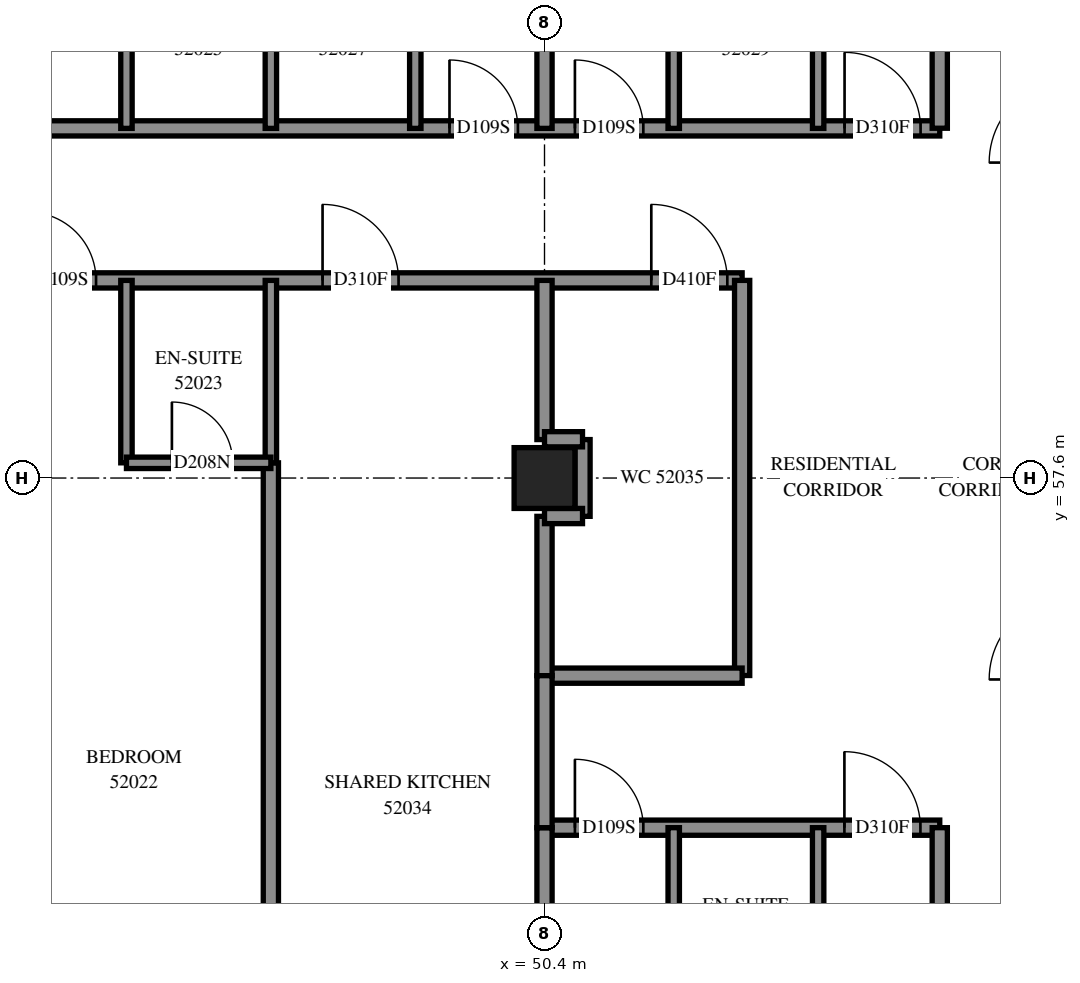
"""IFC4 building model, lengths in metres.
Left out: names, types, materials, properties, quantities, classifications, styles, units other than length and angle.
Written with IfcOpenShell. Run it as: python <this file> out.ifc"""

import sys

from ifc_helpers import new_model, si_unit, direction, frame, frame_2d, origin, origin_2d, place, context, subcontext, project, spatial, rectangle, extrude, element, fill, save


model = new_model("IFC4")
c1 = context("Model", 3, precision=1e-05, world=origin(), true_north=direction((0.0, 1.0)))
c2 = subcontext(c1, "Body", "Model", "MODEL_VIEW")
j1 = project(units=[si_unit("LENGTHUNIT", "METRE"), si_unit("PLANEANGLEUNIT", "RADIAN")], contexts=[c1])
p1 = place(None, origin())
s1 = spatial("IfcSite", under=j1, at=p1, CompositionType="ELEMENT")
p2 = place(p1, origin())
s2 = spatial("IfcBuilding", under=s1, at=p2, CompositionType="ELEMENT")
p3 = place(p2, frame((0.0, 0.0, 193.0)))
s3 = spatial("IfcBuildingStorey", under=s2, at=p3, CompositionType="ELEMENT", Elevation=193.0)
p4 = place(p3, frame((50.4, 57.6, 0.0), z_axis=(0.0, 0.0, 1.0), x_axis=(1.0, 0.0, 0.0)))
e1 = element("IfcColumn", 1, at=p4, inside=s3, PredefinedType="COLUMN", context=c2, shape_type="SweptSolid", body=[
    extrude(rectangle(XDim=0.8, YDim=0.8, at=origin_2d()), origin(), (0.0, 0.0, 1.0), 3.1),
])
p5 = place(p3, frame((36.0, 60.2, 0.0), z_axis=(0.0, 0.0, 1.0), x_axis=(1.0, 0.0, 0.0)))
e2 = element("IfcWall", 2, at=p5, inside=s3, PredefinedType="PARTITIONING", context=c2, shape_type="SweptSolid", body=[
    extrude(rectangle(XDim=17.0, YDim=0.2, at=frame_2d((8.5, 0.0))), origin(), (0.0, 0.0, 1.0), 3.1),
])
p6 = place(p5, frame((4.125, 0.0, 0.0)))
e3 = element("IfcOpeningElement", 3, at=p6, cuts=e2, PredefinedType="OPENING", context=c2, shape_type="SweptSolid", body=[
    extrude(rectangle(XDim=1.0, YDim=2.1, at=frame_2d((0.5, 1.05))), frame((0.0, 0.11, 0.0), z_axis=(0.0, -1.0, 0.0), x_axis=(1.0, 0.0, 0.0)), (0.0, 0.0, 1.0), 0.22),
])
p7 = place(p5, frame((7.6, 0.0, 0.0)))
e4 = element("IfcOpeningElement", 4, at=p7, cuts=e2, PredefinedType="OPENING", context=c2, shape_type="SweptSolid", body=[
    extrude(rectangle(XDim=0.9, YDim=2.1, at=frame_2d((0.45, 1.05))), frame((0.0, 0.11, 0.0), z_axis=(0.0, -1.0, 0.0), x_axis=(1.0, 0.0, 0.0)), (0.0, 0.0, 1.0), 0.22),
])
p8 = place(p5, frame((11.48, 0.0, 0.0)))
e5 = element("IfcOpeningElement", 5, at=p8, cuts=e2, PredefinedType="OPENING", context=c2, shape_type="SweptSolid", body=[
    extrude(rectangle(XDim=1.0, YDim=2.1, at=frame_2d((0.5, 1.05))), frame((0.0, 0.11, 0.0), z_axis=(0.0, -1.0, 0.0), x_axis=(1.0, 0.0, 0.0)), (0.0, 0.0, 1.0), 0.22),
])
p9 = place(p5, frame((15.805, 0.0, 0.0)))
e6 = element("IfcOpeningElement", 6, at=p9, cuts=e2, PredefinedType="OPENING", context=c2, shape_type="SweptSolid", body=[
    extrude(rectangle(XDim=1.0, YDim=2.1, at=frame_2d((0.5, 1.05))), frame((0.0, 0.11, 0.0), z_axis=(0.0, -1.0, 0.0), x_axis=(1.0, 0.0, 0.0)), (0.0, 0.0, 1.0), 0.22),
])
p10 = place(p3, frame((40.602, 62.2, 0.0), z_axis=(0.0, 0.0, 1.0), x_axis=(1.0, 0.0, 0.0)))
e7 = element("IfcWall", 7, at=p10, inside=s3, PredefinedType="PARTITIONING", context=c2, shape_type="SweptSolid", body=[
    extrude(rectangle(XDim=14.998, YDim=0.2, at=frame_2d((7.499, 0.0))), origin(), (0.0, 0.0, 1.0), 3.1),
])
p11 = place(p10, frame((1.306, 0.0, 0.0)))
e8 = element("IfcOpeningElement", 8, at=p11, cuts=e7, PredefinedType="OPENING", context=c2, shape_type="SweptSolid", body=[
    extrude(rectangle(XDim=0.9, YDim=2.1, at=frame_2d((0.45, 1.05))), frame((0.0, 0.11, 0.0), z_axis=(0.0, -1.0, 0.0), x_axis=(1.0, 0.0, 0.0)), (0.0, 0.0, 1.0), 0.22),
])
p12 = place(p10, frame((8.548, 0.0, 0.0)))
e9 = element("IfcOpeningElement", 9, at=p12, cuts=e7, PredefinedType="OPENING", context=c2, shape_type="SweptSolid", body=[
    extrude(rectangle(XDim=0.9, YDim=2.1, at=frame_2d((0.45, 1.05))), frame((0.0, 0.11, 0.0), z_axis=(0.0, -1.0, 0.0), x_axis=(1.0, 0.0, 0.0)), (0.0, 0.0, 1.0), 0.22),
])
p13 = place(p10, frame((10.198, 0.0, 0.0)))
e10 = element("IfcOpeningElement", 10, at=p13, cuts=e7, PredefinedType="OPENING", context=c2, shape_type="SweptSolid", body=[
    extrude(rectangle(XDim=0.9, YDim=2.1, at=frame_2d((0.45, 1.05))), frame((0.0, 0.11, 0.0), z_axis=(0.0, -1.0, 0.0), x_axis=(1.0, 0.0, 0.0)), (0.0, 0.0, 1.0), 0.22),
])
p14 = place(p10, frame((13.746, 0.0, 0.0)))
e11 = element("IfcOpeningElement", 11, at=p14, cuts=e7, PredefinedType="OPENING", context=c2, shape_type="SweptSolid", body=[
    extrude(rectangle(XDim=1.0, YDim=2.1, at=frame_2d((0.5, 1.05))), frame((0.0, 0.11, 0.0), z_axis=(0.0, -1.0, 0.0), x_axis=(1.0, 0.0, 0.0)), (0.0, 0.0, 1.0), 0.22),
])
p15 = place(p3, frame((46.8, 49.7, 0.0), z_axis=(0.0, 0.0, 1.0), x_axis=(0.0, 1.0, 0.0)))
e12 = element("IfcWall", 12, at=p15, inside=s3, PredefinedType="PARTITIONING", context=c2, shape_type="SweptSolid", body=[
    extrude(rectangle(XDim=8.1, YDim=0.2, at=frame_2d((4.05, 0.0))), origin(), (0.0, 0.0, 1.0), 3.1),
])
p16 = place(p3, frame((50.4, 53.0, 0.0), z_axis=(0.0, 0.0, 1.0), x_axis=(1.0, 0.0, 0.0)))
e13 = element("IfcWall", 13, at=p16, inside=s3, PredefinedType="PARTITIONING", context=c2, shape_type="SweptSolid", body=[
    extrude(rectangle(XDim=5.2, YDim=0.2, at=frame_2d((2.6, 0.0))), origin(), (0.0, 0.0, 1.0), 3.1),
])
p17 = place(p16, frame((0.4, 0.0, 0.0)))
e14 = element("IfcOpeningElement", 14, at=p17, cuts=e13, PredefinedType="OPENING", context=c2, shape_type="SweptSolid", body=[
    extrude(rectangle(XDim=0.9, YDim=2.1, at=frame_2d((0.45, 1.05))), frame((0.0, 0.11, 0.0), z_axis=(0.0, -1.0, 0.0), x_axis=(1.0, 0.0, 0.0)), (0.0, 0.0, 1.0), 0.22),
])
p18 = place(p16, frame((3.946, 0.0, 0.0)))
e15 = element("IfcOpeningElement", 15, at=p18, cuts=e13, PredefinedType="OPENING", context=c2, shape_type="SweptSolid", body=[
    extrude(rectangle(XDim=1.0, YDim=2.1, at=frame_2d((0.5, 1.05))), frame((0.0, 0.11, 0.0), z_axis=(0.0, -1.0, 0.0), x_axis=(1.0, 0.0, 0.0)), (0.0, 0.0, 1.0), 0.22),
])
p19 = place(p3, frame((53.0, 55.002, 0.0), z_axis=(0.0, 0.0, 1.0), x_axis=(0.0, 1.0, 0.0)))
e16 = element("IfcWall", 16, at=p19, inside=s3, PredefinedType="PARTITIONING", context=c2, shape_type="SweptSolid", body=[
    extrude(rectangle(XDim=5.198, YDim=0.2, at=frame_2d((2.599, 0.0))), origin(), (0.0, 0.0, 1.0), 3.1),
])
p20 = place(p3, frame((55.6, 48.4, 0.0), z_axis=(0.0, 0.0, 1.0), x_axis=(0.0, 1.0, 0.0)))
e17 = element("IfcWall", 17, at=p20, inside=s3, PredefinedType="PARTITIONING", context=c2, shape_type="SweptSolid", body=[
    extrude(rectangle(XDim=4.6, YDim=0.2, at=frame_2d((2.3, 0.0))), origin(), (0.0, 0.0, 1.0), 3.1),
])
p21 = place(p3, frame((55.6, 62.202, 0.0), z_axis=(0.0, 0.0, 1.0), x_axis=(0.0, 1.0, 0.0)))
e18 = element("IfcWall", 18, at=p21, inside=s3, PredefinedType="PARTITIONING", context=c2, shape_type="SweptSolid", body=[
    extrude(rectangle(XDim=4.598, YDim=0.2, at=frame_2d((2.299, 0.0))), origin(), (0.0, 0.0, 1.0), 3.1),
])
p22 = place(p3, frame((50.4, 55.0, 0.0), z_axis=(0.0, 0.0, 1.0), x_axis=(1.0, 0.0, 0.0)))
e19 = element("IfcWall", 19, at=p22, inside=s3, PredefinedType="PARTITIONING", context=c2, shape_type="SweptSolid", body=[
    extrude(rectangle(XDim=2.6, YDim=0.2, at=frame_2d((1.3, 0.0))), origin(), (0.0, 0.0, 1.0), 3.1),
])
for number, where, z_axis, x_axis in (
    (20, (44.9, 57.8, 0.0), (0.0, 0.0, 1.0), (0.0, 1.0, 0.0)),
    (21, (46.8, 57.8, 0.0), (0.0, 0.0, 1.0), (0.0, 1.0, 0.0)),
    (22, (52.1, 50.6, 0.0), (0.0, 0.0, 1.0), (0.0, 1.0, 0.0)),
    (23, (54.0, 50.6, 0.0), (0.0, 0.0, 1.0), (0.0, 1.0, 0.0)),
    (24, (44.9, 62.2, 0.0), (0.0, 0.0, 1.0), (0.0, 1.0, 0.0)),
    (25, (46.8, 62.2, 0.0), (0.0, 0.0, 1.0), (0.0, 1.0, 0.0)),
    (26, (48.7, 62.2, 0.0), (0.0, 0.0, 1.0), (0.0, 1.0, 0.0)),
    (27, (52.1, 62.2, 0.0), (0.0, 0.0, 1.0), (0.0, 1.0, 0.0)),
    (28, (54.0, 62.2, 0.0), (0.0, 0.0, 1.0), (0.0, 1.0, 0.0)),
):
    element("IfcWall", number, at=place(p3, frame(where, z_axis=z_axis, x_axis=x_axis)), inside=s3, PredefinedType="PARTITIONING", context=c2, shape_type="SweptSolid", body=[
        extrude(rectangle(XDim=2.4, YDim=0.15, at=frame_2d((1.2, 0.0))), origin(), (0.0, 0.0, 1.0), 3.1),
    ])
for number, where, z_axis, x_axis in (
    (29, (50.4, 50.8, 0.0), (0.0, 0.0, 1.0), (0.0, 1.0, 0.0)),
    (30, (50.4, 62.2, 0.0), (0.0, 0.0, 1.0), (0.0, 1.0, 0.0)),
):
    element("IfcWall", number, at=place(p3, frame(where, z_axis=z_axis, x_axis=x_axis)), inside=s3, PredefinedType="PARTITIONING", context=c2, shape_type="SweptSolid", body=[
        extrude(rectangle(XDim=2.2, YDim=0.2, at=frame_2d((1.1, 0.0))), origin(), (0.0, 0.0, 1.0), 3.1),
    ])
p23 = place(p3, frame((50.4, 55.0, 0.0), z_axis=(0.0, 0.0, 1.0), x_axis=(0.0, 1.0, 0.0)))
e31 = element("IfcWall", 31, at=p23, inside=s3, PredefinedType="PARTITIONING", context=c2, shape_type="SweptSolid", body=[
    extrude(rectangle(XDim=2.096, YDim=0.2, at=frame_2d((1.048, 0.0))), origin(), (0.0, 0.0, 1.0), 3.1),
])
p24 = place(p3, frame((50.4, 58.106, 0.0), z_axis=(0.0, 0.0, 1.0), x_axis=(0.0, 1.0, 0.0)))
e32 = element("IfcWall", 32, at=p24, inside=s3, PredefinedType="PARTITIONING", context=c2, shape_type="SweptSolid", body=[
    extrude(rectangle(XDim=2.094, YDim=0.2, at=frame_2d((1.047, 0.0))), origin(), (0.0, 0.0, 1.0), 3.1),
])
p25 = place(p3, frame((50.4, 53.0, 0.0), z_axis=(0.0, 0.0, 1.0), x_axis=(0.0, 1.0, 0.0)))
e33 = element("IfcWall", 33, at=p25, inside=s3, PredefinedType="PARTITIONING", context=c2, shape_type="SweptSolid", body=[
    extrude(rectangle(XDim=2.0, YDim=0.2, at=frame_2d((1.0, 0.0))), origin(), (0.0, 0.0, 1.0), 3.1),
])
p26 = place(p3, frame((44.9, 57.8, 0.0), z_axis=(0.0, 0.0, 1.0), x_axis=(1.0, 0.0, 0.0)))
e34 = element("IfcWall", 34, at=p26, inside=s3, PredefinedType="PARTITIONING", context=c2, shape_type="SweptSolid", body=[
    extrude(rectangle(XDim=1.9, YDim=0.15, at=frame_2d((0.95, 0.0))), origin(), (0.0, 0.0, 1.0), 3.1),
])
p27 = place(p26, frame((0.598, 0.0, 0.0)))
e35 = element("IfcOpeningElement", 35, at=p27, cuts=e34, PredefinedType="OPENING", context=c2, shape_type="SweptSolid", body=[
    extrude(rectangle(XDim=0.8, YDim=2.1, at=frame_2d((0.4, 1.05))), frame((0.0, 0.085, 0.0), z_axis=(0.0, -1.0, 0.0), x_axis=(1.0, 0.0, 0.0)), (0.0, 0.0, 1.0), 0.17),
])
p28 = place(p3, frame((50.9, 57.096, 0.0), z_axis=(0.0, 0.0, 1.0), x_axis=(0.0, 1.0, 0.0)))
e36 = element("IfcWall", 36, at=p28, inside=s3, PredefinedType="PARTITIONING", context=c2, shape_type="SweptSolid", body=[
    extrude(rectangle(XDim=1.01, YDim=0.2, at=frame_2d((0.505, 0.0))), origin(), (0.0, 0.0, 1.0), 3.1),
])
for number, where, z_axis, x_axis in (
    (37, (50.4, 58.11, 0.0), (0.0, 0.0, 1.0), (1.0, 0.0, 0.0)),
    (38, (50.4, 57.1, 0.0), (0.0, 0.0, 1.0), (1.0, 0.0, 0.0)),
):
    element("IfcWall", number, at=place(p3, frame(where, z_axis=z_axis, x_axis=x_axis)), inside=s3, PredefinedType="PARTITIONING", context=c2, shape_type="SweptSolid", body=[
        extrude(rectangle(XDim=0.5, YDim=0.2, at=frame_2d((0.25, 0.0))), origin(), (0.0, 0.0, 1.0), 3.1),
    ])
p29 = place(p7, origin())
e39 = element("IfcDoor", 39, at=p29, inside=s3, OperationType="SINGLE_SWING_LEFT", PredefinedType="DOOR", context=c2, shape_type="SweptSolid", body=[
    extrude(rectangle(XDim=0.9, YDim=2.1, at=frame_2d((0.45, 1.05))), frame((0.0, 0.025, 0.0), z_axis=(0.0, -1.0, 0.0), x_axis=(1.0, 0.0, 0.0)), (0.0, 0.0, 1.0), 0.05),
])
fill(e4, e39)
p30 = place(p27, origin())
e40 = element("IfcDoor", 40, at=p30, inside=s3, OperationType="SINGLE_SWING_RIGHT", PredefinedType="DOOR", context=c2, shape_type="SweptSolid", body=[
    extrude(rectangle(XDim=0.8, YDim=2.1, at=frame_2d((0.4, 1.05))), frame((0.0, 0.025, 0.0), z_axis=(0.0, -1.0, 0.0), x_axis=(1.0, 0.0, 0.0)), (0.0, 0.0, 1.0), 0.05),
])
fill(e35, e40)
p31 = place(p12, origin())
e41 = element("IfcDoor", 41, at=p31, inside=s3, OperationType="SINGLE_SWING_LEFT", PredefinedType="DOOR", context=c2, shape_type="SweptSolid", body=[
    extrude(rectangle(XDim=0.9, YDim=2.1, at=frame_2d((0.45, 1.05))), frame((0.0, 0.025, 0.0), z_axis=(0.0, -1.0, 0.0), x_axis=(1.0, 0.0, 0.0)), (0.0, 0.0, 1.0), 0.05),
])
fill(e9, e41)
p32 = place(p13, origin())
e42 = element("IfcDoor", 42, at=p32, inside=s3, OperationType="SINGLE_SWING_RIGHT", PredefinedType="DOOR", context=c2, shape_type="SweptSolid", body=[
    extrude(rectangle(XDim=0.9, YDim=2.1, at=frame_2d((0.45, 1.05))), frame((0.0, 0.025, 0.0), z_axis=(0.0, -1.0, 0.0), x_axis=(1.0, 0.0, 0.0)), (0.0, 0.0, 1.0), 0.05),
])
fill(e10, e42)
p33 = place(p14, origin())
e43 = element("IfcDoor", 43, at=p33, inside=s3, OperationType="SINGLE_SWING_LEFT", PredefinedType="DOOR", context=c2, shape_type="SweptSolid", body=[
    extrude(rectangle(XDim=1.0, YDim=2.1, at=frame_2d((0.5, 1.05))), frame((0.0, 0.025, 0.0), z_axis=(0.0, -1.0, 0.0), x_axis=(1.0, 0.0, 0.0)), (0.0, 0.0, 1.0), 0.05),
])
fill(e11, e43)
p34 = place(p8, origin())
e44 = element("IfcDoor", 44, at=p34, inside=s3, OperationType="SINGLE_SWING_RIGHT", PredefinedType="DOOR", context=c2, shape_type="SweptSolid", body=[
    extrude(rectangle(XDim=1.0, YDim=2.1, at=frame_2d((0.5, 1.05))), frame((0.0, 0.025, 0.0), z_axis=(0.0, -1.0, 0.0), x_axis=(1.0, 0.0, 0.0)), (0.0, 0.0, 1.0), 0.05),
])
fill(e5, e44)
p35 = place(p9, origin())
e45 = element("IfcDoor", 45, at=p35, inside=s3, OperationType="SINGLE_SWING_LEFT", PredefinedType="DOOR", context=c2, shape_type="SweptSolid", body=[
    extrude(rectangle(XDim=1.0, YDim=2.1, at=frame_2d((0.5, 1.05))), frame((0.0, 0.025, 0.0), z_axis=(0.0, -1.0, 0.0), x_axis=(1.0, 0.0, 0.0)), (0.0, 0.0, 1.0), 0.05),
])
fill(e6, e45)
p36 = place(p17, origin())
e46 = element("IfcDoor", 46, at=p36, inside=s3, OperationType="SINGLE_SWING_LEFT", PredefinedType="DOOR", context=c2, shape_type="SweptSolid", body=[
    extrude(rectangle(XDim=0.9, YDim=2.1, at=frame_2d((0.45, 1.05))), frame((0.0, 0.025, 0.0), z_axis=(0.0, -1.0, 0.0), x_axis=(1.0, 0.0, 0.0)), (0.0, 0.0, 1.0), 0.05),
])
fill(e14, e46)
p37 = place(p18, origin())
e47 = element("IfcDoor", 47, at=p37, inside=s3, OperationType="SINGLE_SWING_RIGHT", PredefinedType="DOOR", context=c2, shape_type="SweptSolid", body=[
    extrude(rectangle(XDim=1.0, YDim=2.1, at=frame_2d((0.5, 1.05))), frame((0.0, 0.025, 0.0), z_axis=(0.0, -1.0, 0.0), x_axis=(1.0, 0.0, 0.0)), (0.0, 0.0, 1.0), 0.05),
])
fill(e15, e47)
save(model, sys.argv[1])
